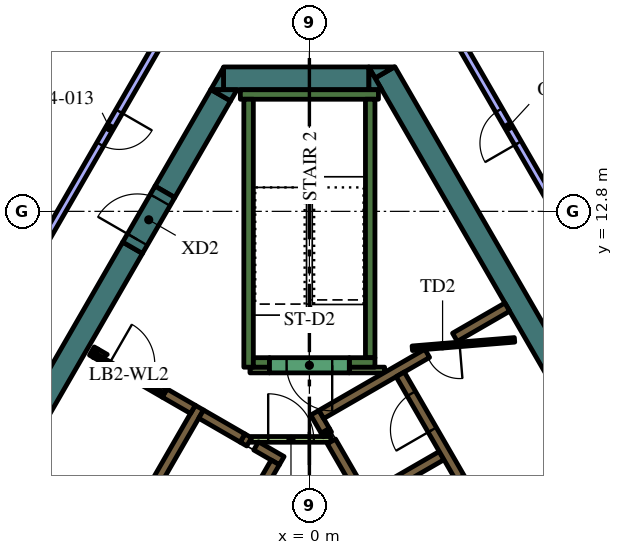
"""IFC4 building model, lengths in metres.
Left out: names, types, materials, properties, quantities, classifications, styles, units other than length and angle.
Written with IfcOpenShell. Run it as: python <this file> out.ifc"""

import sys

from ifc_helpers import new_model, si_unit, direction, frame, frame_2d, origin, place, context, subcontext, project, spatial, polyline, rectangle, outline, extrude, element, fill, save


model = new_model("IFC4")
c1 = context("Model", 3, precision=1e-05, world=origin(), true_north=direction((0.0, 1.0)))
c2 = subcontext(c1, "Body", "Model", "MODEL_VIEW")
j1 = project(units=[si_unit("LENGTHUNIT", "METRE"), si_unit("PLANEANGLEUNIT", "RADIAN")], contexts=[c1])
p1 = place(None, origin())
s1 = spatial("IfcSite", under=j1, at=p1, CompositionType="ELEMENT")
p2 = place(p1, origin())
s2 = spatial("IfcBuilding", under=s1, at=p2, CompositionType="ELEMENT")
p3 = place(p2, frame((0.0, 0.0, 309.0)))
s3 = spatial("IfcBuildingStorey", under=s2, at=p3, CompositionType="ELEMENT", Elevation=309.0)
p4 = place(p3, frame((1.989, 16.456, 0.0), z_axis=(0.0, 0.0, 1.0), x_axis=(0.49999102663, -0.8660305845, 0.0)))
e1 = element("IfcWall", 1, at=p4, inside=s3, PredefinedType="SOLIDWALL", context=c2, shape_type="SweptSolid", body=[
    extrude(rectangle(XDim=12.406, YDim=0.6, at=frame_2d((6.203, 0.0))), origin(), (0.0, 0.0, 1.0), 4.2),
])
p5 = place(p3, origin())
e2 = element("IfcWall", 2, at=p5, inside=s3, PredefinedType="SOLIDWALL", context=c2, shape_type="SweptSolid", body=[
    extrude(outline(polyline([(1.559, 16.6), (2.235, 16.6), (1.728, 16.307), (1.559, 16.6)])), origin(), (0.0, 0.0, 1.0), 4.2),
])
p6 = place(p3, frame((-2.258, 16.3, 0.0), z_axis=(0.0, 0.0, 1.0), x_axis=(1.0, 0.0, 0.0)))
e3 = element("IfcWall", 3, at=p6, inside=s3, PredefinedType="SOLIDWALL", context=c2, shape_type="SweptSolid", body=[
    extrude(rectangle(XDim=3.823, YDim=0.6, at=frame_2d((1.912, 0.0))), origin(), (0.0, 0.0, 1.0), 4.2),
])
e4 = element("IfcWall", 4, at=p5, inside=s3, PredefinedType="SOLIDWALL", context=c2, shape_type="SweptSolid", body=[
    extrude(outline(polyline([(1.905, 16.0), (1.567, 16.0), (1.567, 16.585), (1.905, 16.0)])), origin(), (0.0, 0.0, 1.0), 4.2),
])
e5 = element("IfcWall", 5, at=p5, inside=s3, PredefinedType="SOLIDWALL", context=c2, shape_type="SweptSolid", body=[
    extrude(outline(polyline([(-2.598, 16.0), (-2.26, 16.585), (-2.26, 16.0), (-2.598, 16.0)])), origin(), (0.0, 0.0, 1.0), 4.2),
])
p7 = place(p3, frame((-2.335, 15.855, 0.0), z_axis=(0.0, 0.0, 1.0), x_axis=(-0.499960127962, -0.866048422692, 0.0)))
e6 = element("IfcWall", 6, at=p7, inside=s3, PredefinedType="SOLIDWALL", context=c2, shape_type="SweptSolid", body=[
    extrude(rectangle(XDim=2.934, YDim=0.6, at=frame_2d((1.467, 0.0))), origin(), (0.0, 0.0, 1.0), 4.2),
])
e7 = element("IfcWall", 7, at=p5, inside=s3, PredefinedType="SOLIDWALL", context=c2, shape_type="SweptSolid", body=[
    extrude(outline(polyline([(-1.905, 16.0), (-2.074, 15.707), (-2.581, 16.0), (-1.905, 16.0)])), origin(), (0.0, 0.0, 1.0), 4.2),
])
p8 = place(p3, frame((-12.582, -1.892, 0.0), z_axis=(0.0, 0.0, 1.0), x_axis=(0.500003640647, 0.866023301845, 0.0)))
e8 = element("IfcWall", 8, at=p8, inside=s3, PredefinedType="SOLIDWALL", context=c2, shape_type="SweptSolid", body=[
    extrude(rectangle(XDim=15.858, YDim=0.6, at=frame_2d((7.929, 0.0))), origin(), (0.0, 0.0, 1.0), 4.2),
])
p9 = place(p3, frame((-1.817, 15.875, 0.0), z_axis=(0.0, 0.0, 1.0), x_axis=(1.0, 0.0, 0.0)))
e9 = element("IfcWall", 9, at=p9, inside=s3, PredefinedType="SOLIDWALL", context=c2, shape_type="SweptSolid", body=[
    extrude(rectangle(XDim=3.634, YDim=0.25, at=frame_2d((1.817, 0.0))), origin(), (0.0, 0.0, 1.0), 4.2),
])
p10 = place(p3, frame((1.6, 8.95, 0.0), z_axis=(0.0, 0.0, 1.0), x_axis=(0.0, 1.0, 0.0)))
e10 = element("IfcWall", 10, at=p10, inside=s3, PredefinedType="SOLIDWALL", context=c2, shape_type="SweptSolid", body=[
    extrude(rectangle(XDim=6.8, YDim=0.25, at=frame_2d((3.4, 0.0))), origin(), (0.0, 0.0, 1.0), 4.2),
])
p11 = place(p3, frame((1.05, 8.825, 0.0), z_axis=(0.0, 0.0, 1.0), x_axis=(1.0, 0.0, 0.0)))
e11 = element("IfcWall", 11, at=p11, inside=s3, PredefinedType="SOLIDWALL", context=c2, shape_type="SweptSolid", body=[
    extrude(rectangle(XDim=0.675, YDim=0.25, at=frame_2d((0.337, 0.0))), origin(), (0.0, 0.0, 1.0), 4.2),
])
p12 = place(p3, frame((-1.6, 8.7, 0.0), z_axis=(0.0, 0.0, 1.0), x_axis=(0.0, 1.0, 0.0)))
e12 = element("IfcWall", 12, at=p12, inside=s3, PredefinedType="SOLIDWALL", context=c2, shape_type="SweptSolid", body=[
    extrude(rectangle(XDim=7.05, YDim=0.25, at=frame_2d((3.525, 0.0))), origin(), (0.0, 0.0, 1.0), 4.2),
])
p13 = place(p3, frame((-1.475, 8.825, 0.0), z_axis=(0.0, 0.0, 1.0), x_axis=(1.0, 0.0, 0.0)))
e13 = element("IfcWall", 13, at=p13, inside=s3, PredefinedType="SOLIDWALL", context=c2, shape_type="SweptSolid", body=[
    extrude(rectangle(XDim=0.425, YDim=0.25, at=frame_2d((0.212, 0.0))), origin(), (0.0, 0.0, 1.0), 4.2),
])
p14 = place(p3, frame((0.473, 6.93, 0.0), z_axis=(0.0, 0.0, 1.0), x_axis=(-0.49972245349, 0.866185586049, 0.0)))
e14 = element("IfcWall", 14, at=p14, inside=s3, PredefinedType="SOLIDWALL", context=c2, shape_type="SweptSolid", body=[
    extrude(rectangle(XDim=0.11, YDim=0.25, at=frame_2d((0.055, 0.0))), origin(), (0.0, 0.0, 1.0), 4.2),
])
p15 = place(p3, frame((6.568, -3.627, 0.0), z_axis=(0.0, 0.0, 1.0), x_axis=(-0.499999455981, 0.866025717874, 0.0)))
e15 = element("IfcWall", 15, at=p15, inside=s3, PredefinedType="SOLIDWALL", context=c2, shape_type="SweptSolid", body=[
    extrude(rectangle(XDim=11.978, YDim=0.25, at=frame_2d((5.989, 0.0))), origin(), (0.0, 0.0, 1.0), 4.2),
])
p16 = place(p3, frame((0.417, 7.027, 0.0), z_axis=(0.0, 0.0, 1.0), x_axis=(-0.500210807569, 0.865903659763, 0.0)))
e16 = element("IfcWall", 16, at=p16, inside=s3, PredefinedType="SOLIDWALL", context=c2, shape_type="SweptSolid", body=[
    extrude(rectangle(XDim=0.548, YDim=0.25, at=frame_2d((0.274, 0.0))), origin(), (0.0, 0.0, 1.0), 4.2),
])
p17 = place(p3, frame((3.1, 9.064, 0.0), z_axis=(0.0, 0.0, 1.0), x_axis=(-0.866030133475, -0.499991807846, 0.0)))
e17 = element("IfcWall", 17, at=p17, inside=s3, PredefinedType="SOLIDWALL", context=c2, shape_type="SweptSolid", body=[
    extrude(rectangle(XDim=3.217, YDim=0.25, at=frame_2d((1.608, 0.0))), origin(), (0.0, 0.0, 1.0), 4.2),
])
p18 = place(p3, frame((1.574, 5.274, 0.0), z_axis=(0.0, 0.0, 1.0), x_axis=(0.866028486751, 0.499994660107, 0.0)))
e18 = element("IfcWall", 18, at=p18, inside=s3, PredefinedType="SOLIDWALL", context=c2, shape_type="SweptSolid", body=[
    extrude(rectangle(XDim=2.2, YDim=0.25, at=frame_2d((1.1, 0.0))), origin(), (0.0, 0.0, 1.0), 4.2),
])
p19 = place(p3, frame((3.83, 9.486, 0.0), z_axis=(0.0, 0.0, 1.0), x_axis=(0.865986202621, 0.500067892261, 0.0)))
e19 = element("IfcWall", 19, at=p19, inside=s3, PredefinedType="SOLIDWALL", context=c2, shape_type="SweptSolid", body=[
    extrude(rectangle(XDim=1.591, YDim=0.25, at=frame_2d((0.795, 0.0))), origin(), (0.0, 0.0, 1.0), 4.2),
])
p20 = place(p3, frame((-8.06, -1.311, 0.0), z_axis=(0.0, 0.0, 1.0), x_axis=(0.50000273126, 0.866023826885, 0.0)))
e20 = element("IfcWall", 20, at=p20, inside=s3, PredefinedType="SOLIDWALL", context=c2, shape_type="SweptSolid", body=[
    extrude(rectangle(XDim=10.33, YDim=0.25, at=frame_2d((5.165, 0.0))), origin(), (0.0, 0.0, 1.0), 4.2),
])
p21 = place(p3, frame((-1.758, 6.835, 0.0), z_axis=(0.0, 0.0, 1.0), x_axis=(0.865982457891, -0.500074377092, 0.0)))
e21 = element("IfcWall", 21, at=p21, inside=s3, PredefinedType="SOLIDWALL", context=c2, shape_type="SweptSolid", body=[
    extrude(rectangle(XDim=0.2, YDim=0.25, at=frame_2d((0.1, 0.0))), origin(), (0.0, 0.0, 1.0), 4.2),
])
p22 = place(p3, frame((-1.76, 6.836, 0.0), z_axis=(0.0, 0.0, 1.0), x_axis=(-0.865952863304, 0.500125622755, 0.0)))
e22 = element("IfcWall", 22, at=p22, inside=s3, PredefinedType="SOLIDWALL", context=c2, shape_type="SweptSolid", body=[
    extrude(rectangle(XDim=1.258, YDim=0.25, at=frame_2d((0.629, 0.0))), origin(), (0.0, 0.0, 1.0), 4.2),
])
p23 = place(p3, frame((-0.728, 6.24, 0.0), z_axis=(0.0, 0.0, 1.0), x_axis=(-0.865955664968, 0.500120771724, 0.0)))
e23 = element("IfcWall", 23, at=p23, inside=s3, PredefinedType="SOLIDWALL", context=c2, shape_type="SweptSolid", body=[
    extrude(rectangle(XDim=0.778, YDim=0.25, at=frame_2d((0.389, 0.0))), origin(), (0.0, 0.0, 1.0), 4.2),
])
p24 = place(p3, frame((-5.725, 9.125, 0.0), z_axis=(0.0, 0.0, 1.0), x_axis=(0.866185586049, -0.49972245349, 0.0)))
e24 = element("IfcWall", 24, at=p24, inside=s3, PredefinedType="SOLIDWALL", context=c2, shape_type="SweptSolid", body=[
    extrude(rectangle(XDim=0.11, YDim=0.25, at=frame_2d((0.055, 0.0))), origin(), (0.0, 0.0, 1.0), 4.2),
])
p25 = place(p3, frame((-3.066, 7.59, 0.0), z_axis=(0.0, 0.0, 1.0), x_axis=(-0.866081358704, 0.49990307071, 0.0)))
e25 = element("IfcWall", 25, at=p25, inside=s3, PredefinedType="SOLIDWALL", context=c2, shape_type="SweptSolid", body=[
    extrude(rectangle(XDim=0.858, YDim=0.25, at=frame_2d((0.429, 0.0))), origin(), (0.0, 0.0, 1.0), 4.2),
])
e26 = element("IfcWall", 26, at=p5, inside=s3, PredefinedType="SOLIDWALL", context=c2, shape_type="SweptSolid", body=[
    extrude(outline(polyline([(-3.748, 8.128), (-3.813, 8.015), (-4.027, 8.139), (-4.017, 8.156), (-4.008, 8.173), (-4.0, 8.192), (-3.995, 8.21), (-3.991, 8.23), (-3.99, 8.25), (-3.99, 8.268), (-3.748, 8.128)])), origin(), (0.0, 0.0, 1.0), 4.2),
])
e27 = element("IfcWall", 27, at=p5, inside=s3, PredefinedType="SOLIDWALL", context=c2, shape_type="SweptSolid", body=[
    extrude(outline(polyline([(-5.689, 8.96), (-5.69, 8.961), (-5.565, 9.177), (-5.319, 9.035), (-5.335, 9.026), (-5.351, 9.015), (-5.366, 9.002), (-5.379, 8.988), (-5.392, 8.972), (-5.402, 8.956), (-5.412, 8.939), (-5.629, 9.064), (-5.629, 9.064), (-5.689, 8.96)])), origin(), (0.0, 0.0, 1.0), 4.2),
])
p26 = place(p3, frame((1.05, 8.625, 0.0), z_axis=(0.0, 0.0, 1.0), x_axis=(1.0, 0.0, 0.0)))
e28 = element("IfcWall", 28, at=p26, inside=s3, PredefinedType="PARTITIONING", context=c2, shape_type="SweptSolid", body=[
    extrude(rectangle(XDim=0.929, YDim=0.15, at=frame_2d((0.464, 0.0))), origin(), (0.0, 0.0, 1.0), 3.55),
])
p27 = place(p3, frame((-1.564, 8.625, 0.0), z_axis=(0.0, 0.0, 1.0), x_axis=(1.0, 0.0, 0.0)))
e29 = element("IfcWall", 29, at=p27, inside=s3, PredefinedType="PARTITIONING", context=c2, shape_type="SweptSolid", body=[
    extrude(rectangle(XDim=0.514, YDim=0.15, at=frame_2d((0.257, 0.0))), origin(), (0.0, 0.0, 1.0), 3.55),
])
p28 = place(p3, frame((8.565, -2.185, 0.0), z_axis=(0.0, 0.0, 1.0), x_axis=(-0.499997954832, 0.866026584559, 0.0)))
e30 = element("IfcWall", 30, at=p28, inside=s3, PredefinedType="SOLIDWALL", context=c2, shape_type="SweptSolid", body=[
    extrude(rectangle(XDim=12.35, YDim=0.25, at=frame_2d((6.175, 0.0))), origin(), (0.0, 0.0, 1.0), 4.2),
])
p29 = place(p28, frame((0.685, 0.0, 0.0)))
e31 = element("IfcOpeningElement", 31, at=p29, cuts=e30, PredefinedType="OPENING", context=c2, shape_type="SweptSolid", body=[
    extrude(rectangle(XDim=0.9, YDim=2.1, at=frame_2d((0.45, 1.05))), frame((0.0, 0.135, 0.0), z_axis=(0.0, -1.0, 0.0), x_axis=(1.0, 0.0, 0.0)), (0.0, 0.0, 1.0), 0.27),
])
p30 = place(p28, frame((3.105, 0.0, 0.0)))
e32 = element("IfcOpeningElement", 32, at=p30, cuts=e30, PredefinedType="OPENING", context=c2, shape_type="SweptSolid", body=[
    extrude(rectangle(XDim=1.1, YDim=2.1, at=frame_2d((0.55, 1.05))), frame((0.0, 0.135, 0.0), z_axis=(0.0, -1.0, 0.0), x_axis=(1.0, 0.0, 0.0)), (0.0, 0.0, 1.0), 0.27),
])
p31 = place(p28, frame((5.625, 0.0, 0.0)))
e33 = element("IfcOpeningElement", 33, at=p31, cuts=e30, PredefinedType="OPENING", context=c2, shape_type="SweptSolid", body=[
    extrude(rectangle(XDim=1.1, YDim=2.1, at=frame_2d((0.55, 1.05))), frame((0.0, 0.135, 0.0), z_axis=(0.0, -1.0, 0.0), x_axis=(1.0, 0.0, 0.0)), (0.0, 0.0, 1.0), 0.27),
])
p32 = place(p28, frame((8.145, 0.0, 0.0)))
e34 = element("IfcOpeningElement", 34, at=p32, cuts=e30, PredefinedType="OPENING", context=c2, shape_type="SweptSolid", body=[
    extrude(rectangle(XDim=1.1, YDim=2.1, at=frame_2d((0.55, 1.05))), frame((0.0, 0.135, 0.0), z_axis=(0.0, -1.0, 0.0), x_axis=(1.0, 0.0, 0.0)), (0.0, 0.0, 1.0), 0.27),
])
p33 = place(p28, frame((10.665, 0.0, 0.0)))
e35 = element("IfcOpeningElement", 35, at=p33, cuts=e30, PredefinedType="OPENING", context=c2, shape_type="SweptSolid", body=[
    extrude(rectangle(XDim=1.1, YDim=2.1, at=frame_2d((0.55, 1.05))), frame((0.0, 0.135, 0.0), z_axis=(0.0, -1.0, 0.0), x_axis=(1.0, 0.0, 0.0)), (0.0, 0.0, 1.0), 0.27),
])
p34 = place(p3, frame((-0.898, 6.194, 0.0), z_axis=(0.0, 0.0, 1.0), x_axis=(-0.499996202215, -0.866027596426, 0.0)))
e36 = element("IfcWall", 36, at=p34, inside=s3, PredefinedType="SOLIDWALL", context=c2, shape_type="SweptSolid", body=[
    extrude(rectangle(XDim=9.83, YDim=0.25, at=frame_2d((4.915, 0.0))), origin(), (0.0, 0.0, 1.0), 4.2),
])
p35 = place(p34, frame((0.585, 0.0, 0.0)))
e37 = element("IfcOpeningElement", 37, at=p35, cuts=e36, PredefinedType="OPENING", context=c2, shape_type="SweptSolid", body=[
    extrude(rectangle(XDim=1.1, YDim=2.1, at=frame_2d((0.55, 1.05))), frame((0.0, 0.135, 0.0), z_axis=(0.0, -1.0, 0.0), x_axis=(1.0, 0.0, 0.0)), (0.0, 0.0, 1.0), 0.27),
])
p36 = place(p34, frame((3.105, 0.0, 0.0)))
e38 = element("IfcOpeningElement", 38, at=p36, cuts=e36, PredefinedType="OPENING", context=c2, shape_type="SweptSolid", body=[
    extrude(rectangle(XDim=1.1, YDim=2.1, at=frame_2d((0.55, 1.05))), frame((0.0, 0.135, 0.0), z_axis=(0.0, -1.0, 0.0), x_axis=(1.0, 0.0, 0.0)), (0.0, 0.0, 1.0), 0.27),
])
p37 = place(p34, frame((5.625, 0.0, 0.0)))
e39 = element("IfcOpeningElement", 39, at=p37, cuts=e36, PredefinedType="OPENING", context=c2, shape_type="SweptSolid", body=[
    extrude(rectangle(XDim=1.1, YDim=2.1, at=frame_2d((0.55, 1.05))), frame((0.0, 0.135, 0.0), z_axis=(0.0, -1.0, 0.0), x_axis=(1.0, 0.0, 0.0)), (0.0, 0.0, 1.0), 0.27),
])
p38 = place(p34, frame((8.145, 0.0, 0.0)))
e40 = element("IfcOpeningElement", 40, at=p38, cuts=e36, PredefinedType="OPENING", context=c2, shape_type="SweptSolid", body=[
    extrude(rectangle(XDim=1.1, YDim=2.1, at=frame_2d((0.55, 1.05))), frame((0.0, 0.135, 0.0), z_axis=(0.0, -1.0, 0.0), x_axis=(1.0, 0.0, 0.0)), (0.0, 0.0, 1.0), 0.27),
])
p39 = place(p3, frame((1.05, 8.75, 0.0), z_axis=(0.0, 0.0, 1.0), x_axis=(-1.0, 0.0, 0.0)))
e41 = element("IfcWall", 41, at=p39, inside=s3, PredefinedType="SOLIDWALL", context=c2, shape_type="SweptSolid", body=[
    extrude(rectangle(XDim=2.1, YDim=0.4, at=frame_2d((1.05, 0.0))), origin(), (0.0, 0.0, 1.0), 4.2),
])
p40 = place(p39, frame((0.45, 0.0, 0.0)))
e42 = element("IfcOpeningElement", 42, at=p40, cuts=e41, PredefinedType="OPENING", context=c2, shape_type="SweptSolid", body=[
    extrude(rectangle(XDim=1.2, YDim=2.1, at=frame_2d((0.6, 1.05))), frame((0.0, 0.21, 0.0), z_axis=(0.0, -1.0, 0.0), x_axis=(1.0, 0.0, 0.0)), (0.0, 0.0, 1.0), 0.42),
])
p41 = place(p3, frame((5.398, 9.419, 0.0), z_axis=(0.0, 0.0, 1.0), x_axis=(-0.996653416376, -0.081743303248, 0.0)))
e43 = element("IfcWall", 43, at=p41, inside=s3, PredefinedType="PARTITIONING", context=c2, shape_type="SweptSolid", body=[
    extrude(rectangle(XDim=2.7, YDim=0.12, at=frame_2d((1.35, 0.0))), origin(), (0.0, 0.0, 1.0), 3.55),
])
p42 = place(p41, frame((1.45, 0.0, 0.0)))
e44 = element("IfcOpeningElement", 44, at=p42, cuts=e43, PredefinedType="OPENING", context=c2, shape_type="SweptSolid", body=[
    extrude(rectangle(XDim=0.9, YDim=2.1, at=frame_2d((0.45, 1.05))), frame((0.0, 0.07, 0.0), z_axis=(0.0, -1.0, 0.0), x_axis=(1.0, 0.0, 0.0)), (0.0, 0.0, 1.0), 0.14),
])
p43 = place(p3, frame((-1.534, 6.8, 0.0), z_axis=(0.0, 0.0, 1.0), x_axis=(1.0, 0.0, 0.0)))
e45 = element("IfcWall", 45, at=p43, inside=s3, PredefinedType="PARTITIONING", context=c2, shape_type="SweptSolid", body=[
    extrude(rectangle(XDim=2.1, YDim=0.15, at=frame_2d((1.05, 0.0))), origin(), (0.0, 0.0, 1.0), 3.55),
])
p44 = place(p43, frame((0.45, 0.0, 0.0)))
e46 = element("IfcOpeningElement", 46, at=p44, cuts=e45, PredefinedType="OPENING", context=c2, shape_type="SweptSolid", body=[
    extrude(rectangle(XDim=1.2, YDim=2.1, at=frame_2d((0.6, 1.05))), frame((0.0, 0.085, 0.0), z_axis=(0.0, -1.0, 0.0), x_axis=(1.0, 0.0, 0.0)), (0.0, 0.0, 1.0), 0.17),
])
p45 = place(p3, frame((-5.659, 9.012, 0.0), z_axis=(0.0, 0.0, 1.0), x_axis=(0.866009402589, -0.500027713859, 0.0)))
e47 = element("IfcWall", 47, at=p45, inside=s3, PredefinedType="PARTITIONING", context=c2, shape_type="SweptSolid", body=[
    extrude(rectangle(XDim=2.1, YDim=0.12, at=frame_2d((1.05, 0.0))), origin(), (0.0, 0.0, 1.0), 3.55),
])
p46 = place(p45, frame((0.45, 0.0, 0.0)))
e48 = element("IfcOpeningElement", 48, at=p46, cuts=e47, PredefinedType="OPENING", context=c2, shape_type="SweptSolid", body=[
    extrude(rectangle(XDim=1.2, YDim=2.1, at=frame_2d((0.6, 1.05))), frame((0.0, 0.07, 0.0), z_axis=(0.0, -1.0, 0.0), x_axis=(1.0, 0.0, 0.0)), (0.0, 0.0, 1.0), 0.14),
])
p47 = place(p3, frame((-4.652, 11.842, 0.0), z_axis=(0.0, 0.0, 1.0), x_axis=(0.500062241894, 0.865989465428, 0.0)))
e49 = element("IfcWall", 49, at=p47, inside=s3, PredefinedType="SOLIDWALL", context=c2, shape_type="SweptSolid", body=[
    extrude(rectangle(XDim=1.7, YDim=0.6, at=frame_2d((0.85, 0.0))), origin(), (0.0, 0.0, 1.0), 4.2),
])
p48 = place(p47, frame((0.25, 0.0, 0.0)))
e50 = element("IfcOpeningElement", 50, at=p48, cuts=e49, PredefinedType="OPENING", context=c2, shape_type="SweptSolid", body=[
    extrude(rectangle(XDim=1.2, YDim=2.1, at=frame_2d((0.6, 1.05))), frame((0.0, 0.31, 0.0), z_axis=(0.0, -1.0, 0.0), x_axis=(1.0, 0.0, 0.0)), (0.0, 0.0, 1.0), 0.62),
])
p49 = place(p3, frame((7.188, 11.65, 0.0), z_axis=(0.0, 0.0, 1.0), x_axis=(-0.499986368499, 0.866033273792, 0.0)))
e51 = element("IfcWall", 51, at=p49, inside=s3, PredefinedType="PARTITIONING", context=c2, shape_type="SweptSolid", body=[
    extrude(rectangle(XDim=7.794, YDim=0.2, at=frame_2d((3.897, 0.0))), origin(), (0.0, 0.0, 1.0), 3.55),
])
p50 = place(p49, frame((3.4, 0.0, 0.0)))
e52 = element("IfcOpeningElement", 52, at=p50, cuts=e51, PredefinedType="OPENING", context=c2, shape_type="SweptSolid", body=[
    extrude(rectangle(XDim=1.0, YDim=2.1, at=frame_2d((0.5, 1.05))), frame((0.0, 0.11, 0.0), z_axis=(0.0, -1.0, 0.0), x_axis=(1.0, 0.0, 0.0)), (0.0, 0.0, 1.0), 0.22),
])
p51 = place(p3, frame((-8.544, 15.69, 0.0), z_axis=(0.0, 0.0, 1.0), x_axis=(0.599538824769, 0.800345673815, 0.0)))
e53 = element("IfcWall", 53, at=p51, inside=s3, PredefinedType="PARTITIONING", context=c2, shape_type="SweptSolid", body=[
    extrude(rectangle(XDim=3.474, YDim=0.15, at=frame_2d((1.737, 0.0))), origin(), (0.0, 0.0, 1.0), 3.55),
])
p52 = place(p51, frame((1.274, 0.0, 0.0)))
e54 = element("IfcOpeningElement", 54, at=p52, cuts=e53, PredefinedType="OPENING", context=c2, shape_type="SweptSolid", body=[
    extrude(rectangle(XDim=0.9, YDim=2.1, at=frame_2d((0.45, 1.05))), frame((0.0, 0.085, 0.0), z_axis=(0.0, -1.0, 0.0), x_axis=(1.0, 0.0, 0.0)), (0.0, 0.0, 1.0), 0.17),
])
p53 = place(p3, frame((-3.306, 18.374, 0.0), z_axis=(0.0, 0.0, 1.0), x_axis=(-0.500000072396, -0.866025361987, 0.0)))
e55 = element("IfcWall", 55, at=p53, inside=s3, PredefinedType="PARTITIONING", context=c2, shape_type="SweptSolid", body=[
    extrude(rectangle(XDim=7.739, YDim=0.2, at=frame_2d((3.87, 0.0))), origin(), (0.0, 0.0, 1.0), 3.55),
])
p54 = place(p53, frame((3.4, 0.0, 0.0)))
e56 = element("IfcOpeningElement", 56, at=p54, cuts=e55, PredefinedType="OPENING", context=c2, shape_type="SweptSolid", body=[
    extrude(rectangle(XDim=1.0, YDim=2.1, at=frame_2d((0.5, 1.05))), frame((0.0, 0.11, 0.0), z_axis=(0.0, -1.0, 0.0), x_axis=(1.0, 0.0, 0.0)), (0.0, 0.0, 1.0), 0.22),
])
p55 = place(p33, origin())
e57 = element("IfcDoor", 57, at=p55, inside=s3, OperationType="DOUBLE_DOOR_SLIDING", PredefinedType="DOOR", context=c2, shape_type="SweptSolid", body=[
    extrude(rectangle(XDim=1.1, YDim=2.1, at=frame_2d((0.55, 1.05))), frame((0.0, 0.025, 0.0), z_axis=(0.0, -1.0, 0.0), x_axis=(1.0, 0.0, 0.0)), (0.0, 0.0, 1.0), 0.05),
])
fill(e35, e57)
p56 = place(p40, origin())
e58 = element("IfcDoor", 58, at=p56, inside=s3, OperationType="SINGLE_SWING_LEFT", PredefinedType="DOOR", context=c2, shape_type="SweptSolid", body=[
    extrude(rectangle(XDim=1.2, YDim=2.1, at=frame_2d((0.6, 1.05))), frame((0.0, 0.025, 0.0), z_axis=(0.0, -1.0, 0.0), x_axis=(1.0, 0.0, 0.0)), (0.0, 0.0, 1.0), 0.05),
])
fill(e42, e58)
p57 = place(p42, origin())
e59 = element("IfcDoor", 59, at=p57, inside=s3, OperationType="SINGLE_SWING_LEFT", PredefinedType="DOOR", context=c2, shape_type="SweptSolid", body=[
    extrude(rectangle(XDim=0.9, YDim=2.1, at=frame_2d((0.45, 1.05))), frame((0.0, 0.025, 0.0), z_axis=(0.0, -1.0, 0.0), x_axis=(1.0, 0.0, 0.0)), (0.0, 0.0, 1.0), 0.05),
])
fill(e44, e59)
p58 = place(p44, origin())
e60 = element("IfcDoor", 60, at=p58, inside=s3, OperationType="SINGLE_SWING_LEFT", PredefinedType="DOOR", context=c2, shape_type="SweptSolid", body=[
    extrude(rectangle(XDim=1.2, YDim=2.1, at=frame_2d((0.6, 1.05))), frame((0.0, 0.025, 0.0), z_axis=(0.0, -1.0, 0.0), x_axis=(1.0, 0.0, 0.0)), (0.0, 0.0, 1.0), 0.05),
])
fill(e46, e60)
p59 = place(p46, origin())
e61 = element("IfcDoor", 61, at=p59, inside=s3, OperationType="SINGLE_SWING_LEFT", PredefinedType="DOOR", context=c2, shape_type="SweptSolid", body=[
    extrude(rectangle(XDim=1.2, YDim=2.1, at=frame_2d((0.6, 1.05))), frame((0.0, 0.025, 0.0), z_axis=(0.0, -1.0, 0.0), x_axis=(1.0, 0.0, 0.0)), (0.0, 0.0, 1.0), 0.05),
])
fill(e48, e61)
p60 = place(p48, origin())
e62 = element("IfcDoor", 62, at=p60, inside=s3, OperationType="SINGLE_SWING_LEFT", PredefinedType="DOOR", context=c2, shape_type="SweptSolid", body=[
    extrude(rectangle(XDim=1.2, YDim=2.1, at=frame_2d((0.6, 1.05))), frame((0.0, 0.025, 0.0), z_axis=(0.0, -1.0, 0.0), x_axis=(1.0, 0.0, 0.0)), (0.0, 0.0, 1.0), 0.05),
])
fill(e50, e62)
p61 = place(p50, origin())
e63 = element("IfcDoor", 63, at=p61, inside=s3, OperationType="SINGLE_SWING_RIGHT", PredefinedType="DOOR", context=c2, shape_type="SweptSolid", body=[
    extrude(rectangle(XDim=1.0, YDim=2.1, at=frame_2d((0.5, 1.05))), frame((0.0, 0.025, 0.0), z_axis=(0.0, -1.0, 0.0), x_axis=(1.0, 0.0, 0.0)), (0.0, 0.0, 1.0), 0.05),
])
fill(e52, e63)
p62 = place(p54, origin())
e64 = element("IfcDoor", 64, at=p62, inside=s3, OperationType="SINGLE_SWING_RIGHT", PredefinedType="DOOR", context=c2, shape_type="SweptSolid", body=[
    extrude(rectangle(XDim=1.0, YDim=2.1, at=frame_2d((0.5, 1.05))), frame((0.0, 0.025, 0.0), z_axis=(0.0, -1.0, 0.0), x_axis=(1.0, 0.0, 0.0)), (0.0, 0.0, 1.0), 0.05),
])
fill(e56, e64)
save(model, sys.argv[1])
